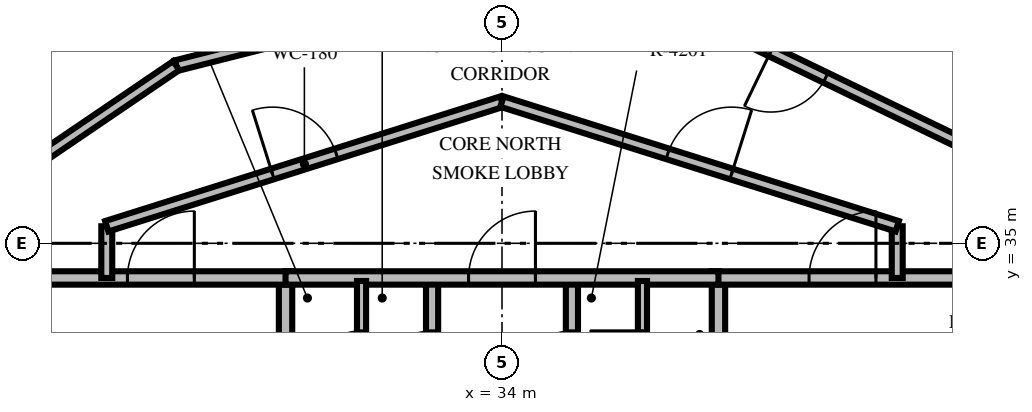
"""IFC4 building model, lengths in metres.
Left out: names, types, materials, properties, quantities, classifications, styles, units other than length and angle.
Written with IfcOpenShell. Run it as: python <this file> out.ifc"""

import sys

from ifc_helpers import new_model, si_unit, direction, frame, frame_2d, origin, place, context, subcontext, project, spatial, rectangle, extrude, element, fill, save


model = new_model("IFC4")
c1 = context("Model", 3, precision=1e-05, world=origin(), true_north=direction((0.0, 1.0)))
c2 = subcontext(c1, "Body", "Model", "MODEL_VIEW")
j1 = project(units=[si_unit("LENGTHUNIT", "METRE"), si_unit("PLANEANGLEUNIT", "RADIAN")], contexts=[c1])
p1 = place(None, origin())
s1 = spatial("IfcSite", under=j1, at=p1, CompositionType="ELEMENT")
p2 = place(p1, origin())
s2 = spatial("IfcBuilding", under=s1, at=p2, CompositionType="ELEMENT")
p3 = place(p2, frame((0.0, 0.0, 177.2)))
s3 = spatial("IfcBuildingStorey", under=s2, at=p3, CompositionType="ELEMENT", Elevation=177.2)
p4 = place(p3, frame((30.44, 30.05, 0.0), z_axis=(0.0, 0.0, 1.0), x_axis=(0.0, 1.0, 0.0)))
e1 = element("IfcWall", 1, at=p4, inside=s3, PredefinedType="SOLIDWALL", context=c2, shape_type="SweptSolid", body=[
    extrude(rectangle(XDim=4.38, YDim=0.22, at=frame_2d((2.19, 0.0))), origin(), (0.0, 0.0, 1.0), 2.46),
])
p5 = place(p4, frame((0.8, 0.0, 0.0)))
e2 = element("IfcOpeningElement", 2, at=p5, cuts=e1, PredefinedType="OPENING", context=c2, shape_type="SweptSolid", body=[
    extrude(rectangle(XDim=1.05, YDim=2.1, at=frame_2d((0.525, 1.05))), frame((0.0, 0.12, 0.0), z_axis=(0.0, -1.0, 0.0), x_axis=(1.0, 0.0, 0.0)), (0.0, 0.0, 1.0), 0.24),
])
p6 = place(p3, frame((26.24, 34.43, 0.0), z_axis=(0.0, 0.0, 1.0), x_axis=(1.0, 0.0, 0.0)))
e3 = element("IfcWall", 3, at=p6, inside=s3, PredefinedType="SOLIDWALL", context=c2, shape_type="SweptSolid", body=[
    extrude(rectangle(XDim=4.31, YDim=0.22, at=frame_2d((2.155, 0.0))), origin(), (0.0, 0.0, 1.0), 2.46),
])
p7 = place(p6, frame((1.6, 0.0, 0.0)))
e4 = element("IfcOpeningElement", 4, at=p7, cuts=e3, PredefinedType="OPENING", context=c2, shape_type="SweptSolid", body=[
    extrude(rectangle(XDim=1.1, YDim=2.15, at=frame_2d((0.55, 1.075))), frame((0.0, 0.12, 0.0), z_axis=(0.0, -1.0, 0.0), x_axis=(1.0, 0.0, 0.0)), (0.0, 0.0, 1.0), 0.24),
])
p8 = place(p3, frame((32.85, 30.05, 0.0), z_axis=(0.0, 0.0, 1.0), x_axis=(0.0, 1.0, 0.0)))
e5 = element("IfcWall", 5, at=p8, inside=s3, PredefinedType="SOLIDWALL", context=c2, shape_type="SweptSolid", body=[
    extrude(rectangle(XDim=4.38, YDim=0.2, at=frame_2d((2.19, 0.0))), origin(), (0.0, 0.0, 1.0), 2.46),
])
p9 = place(p8, frame((2.65, 0.0, 0.0)))
e6 = element("IfcOpeningElement", 6, at=p9, cuts=e5, PredefinedType="OPENING", context=c2, shape_type="SweptSolid", body=[
    extrude(rectangle(XDim=0.86, YDim=2.05, at=frame_2d((0.43, 1.025))), frame((0.0, 0.11, 0.0), z_axis=(0.0, -1.0, 0.0), x_axis=(1.0, 0.0, 0.0)), (0.0, 0.0, 1.0), 0.22),
])
p10 = place(p3, frame((37.56, 30.05, 0.0), z_axis=(0.0, 0.0, 1.0), x_axis=(0.0, 1.0, 0.0)))
e7 = element("IfcWall", 7, at=p10, inside=s3, PredefinedType="SOLIDWALL", context=c2, shape_type="SweptSolid", body=[
    extrude(rectangle(XDim=4.38, YDim=0.22, at=frame_2d((2.19, 0.0))), origin(), (0.0, 0.0, 1.0), 2.46),
])
p11 = place(p10, frame((0.8, 0.0, 0.0)))
e8 = element("IfcOpeningElement", 8, at=p11, cuts=e7, PredefinedType="OPENING", context=c2, shape_type="SweptSolid", body=[
    extrude(rectangle(XDim=1.05, YDim=2.1, at=frame_2d((0.525, 1.05))), frame((0.0, 0.12, 0.0), z_axis=(0.0, -1.0, 0.0), x_axis=(1.0, 0.0, 0.0)), (0.0, 0.0, 1.0), 0.24),
])
p12 = place(p3, frame((37.45, 34.43, 0.0), z_axis=(0.0, 0.0, 1.0), x_axis=(1.0, 0.0, 0.0)))
e9 = element("IfcWall", 9, at=p12, inside=s3, PredefinedType="SOLIDWALL", context=c2, shape_type="SweptSolid", body=[
    extrude(rectangle(XDim=4.31, YDim=0.22, at=frame_2d((2.155, 0.0))), origin(), (0.0, 0.0, 1.0), 2.46),
])
p13 = place(p12, frame((1.6, 0.0, 0.0)))
e10 = element("IfcOpeningElement", 10, at=p13, cuts=e9, PredefinedType="OPENING", context=c2, shape_type="SweptSolid", body=[
    extrude(rectangle(XDim=1.1, YDim=2.15, at=frame_2d((0.55, 1.075))), frame((0.0, 0.12, 0.0), z_axis=(0.0, -1.0, 0.0), x_axis=(1.0, 0.0, 0.0)), (0.0, 0.0, 1.0), 0.24),
])
p14 = place(p3, frame((35.15, 30.05, 0.0), z_axis=(0.0, 0.0, 1.0), x_axis=(0.0, 1.0, 0.0)))
e11 = element("IfcWall", 11, at=p14, inside=s3, PredefinedType="SOLIDWALL", context=c2, shape_type="SweptSolid", body=[
    extrude(rectangle(XDim=4.38, YDim=0.2, at=frame_2d((2.19, 0.0))), origin(), (0.0, 0.0, 1.0), 2.46),
])
p15 = place(p14, frame((2.65, 0.0, 0.0)))
e12 = element("IfcOpeningElement", 12, at=p15, cuts=e11, PredefinedType="OPENING", context=c2, shape_type="SweptSolid", body=[
    extrude(rectangle(XDim=0.86, YDim=2.05, at=frame_2d((0.43, 1.025))), frame((0.0, 0.11, 0.0), z_axis=(0.0, -1.0, 0.0), x_axis=(1.0, 0.0, 0.0)), (0.0, 0.0, 1.0), 0.22),
])
p16 = place(p3, frame((30.44, 34.43, 0.0), z_axis=(0.0, 0.0, 1.0), x_axis=(1.0, 0.0, 0.0)))
e13 = element("IfcWall", 13, at=p16, inside=s3, PredefinedType="SOLIDWALL", context=c2, shape_type="SweptSolid", body=[
    extrude(rectangle(XDim=7.12, YDim=0.22, at=frame_2d((3.56, 0.0))), origin(), (0.0, 0.0, 1.0), 2.46),
])
p17 = place(p16, frame((3.01, 0.0, 0.0)))
e14 = element("IfcOpeningElement", 14, at=p17, cuts=e13, PredefinedType="OPENING", context=c2, shape_type="SweptSolid", body=[
    extrude(rectangle(XDim=1.1, YDim=2.15, at=frame_2d((0.55, 1.075))), frame((0.0, 0.12, 0.0), z_axis=(0.0, -1.0, 0.0), x_axis=(1.0, 0.0, 0.0)), (0.0, 0.0, 1.0), 0.24),
])
p18 = place(p3, frame((31.69, 32.05, 0.0), z_axis=(0.0, 0.0, 1.0), x_axis=(0.0, 1.0, 0.0)))
e15 = element("IfcWall", 15, at=p18, inside=s3, PredefinedType="PARTITIONING", context=c2, shape_type="SweptSolid", body=[
    extrude(rectangle(XDim=2.33, YDim=0.15, at=frame_2d((1.165, 0.0))), origin(), (0.0, 0.0, 1.0), 2.46),
])
p19 = place(p18, frame((0.65, 0.0, 0.0)))
e16 = element("IfcOpeningElement", 16, at=p19, cuts=e15, PredefinedType="OPENING", context=c2, shape_type="SweptSolid", body=[
    extrude(rectangle(XDim=0.86, YDim=2.05, at=frame_2d((0.43, 1.025))), frame((0.0, 0.085, 0.0), z_axis=(0.0, -1.0, 0.0), x_axis=(1.0, 0.0, 0.0)), (0.0, 0.0, 1.0), 0.17),
])
p20 = place(p3, frame((36.31, 32.05, 0.0), z_axis=(0.0, 0.0, 1.0), x_axis=(0.0, 1.0, 0.0)))
e17 = element("IfcWall", 17, at=p20, inside=s3, PredefinedType="PARTITIONING", context=c2, shape_type="SweptSolid", body=[
    extrude(rectangle(XDim=2.33, YDim=0.15, at=frame_2d((1.165, 0.0))), origin(), (0.0, 0.0, 1.0), 2.46),
])
p21 = place(p20, frame((0.65, 0.0, 0.0)))
e18 = element("IfcOpeningElement", 18, at=p21, cuts=e17, PredefinedType="OPENING", context=c2, shape_type="SweptSolid", body=[
    extrude(rectangle(XDim=0.86, YDim=2.05, at=frame_2d((0.43, 1.025))), frame((0.0, 0.085, 0.0), z_axis=(0.0, -1.0, 0.0), x_axis=(1.0, 0.0, 0.0)), (0.0, 0.0, 1.0), 0.17),
])
for number, where, z_axis, x_axis in (
    (19, (27.5, 34.43, 0.0), (0.0, 0.0, 1.0), (0.0, 1.0, 0.0)),
    (20, (40.5, 35.28, 0.0), (0.0, 0.0, 1.0), (0.0, -1.0, 0.0)),
):
    element("IfcWall", number, at=place(p3, frame(where, z_axis=z_axis, x_axis=x_axis)), inside=s3, PredefinedType="PARTITIONING", context=c2, shape_type="SweptSolid", body=[
        extrude(rectangle(XDim=0.85, YDim=0.18, at=frame_2d((0.425, 0.0))), origin(), (0.0, 0.0, 1.0), 2.46),
    ])
p22 = place(p3, frame((27.5, 35.28, 0.0), z_axis=(0.0, 0.0, 1.0), x_axis=(0.953691418528, 0.300786765376, 0.0)))
e21 = element("IfcWall", 21, at=p22, inside=s3, PredefinedType="PARTITIONING", context=c2, shape_type="SweptSolid", body=[
    extrude(rectangle(XDim=6.816, YDim=0.18, at=frame_2d((3.408, 0.0))), origin(), (0.0, 0.0, 1.0), 2.46),
])
p23 = place(p22, frame((2.858, 0.0, 0.0)))
e22 = element("IfcOpeningElement", 22, at=p23, cuts=e21, PredefinedType="OPENING", context=c2, shape_type="SweptSolid", body=[
    extrude(rectangle(XDim=1.1, YDim=2.15, at=frame_2d((0.55, 1.075))), frame((0.0, 0.1, 0.0), z_axis=(0.0, -1.0, 0.0), x_axis=(1.0, 0.0, 0.0)), (0.0, 0.0, 1.0), 0.2),
])
p24 = place(p3, frame((34.0, 37.33, 0.0), z_axis=(0.0, 0.0, 1.0), x_axis=(0.953691418528, -0.300786765376, 0.0)))
e23 = element("IfcWall", 23, at=p24, inside=s3, PredefinedType="PARTITIONING", context=c2, shape_type="SweptSolid", body=[
    extrude(rectangle(XDim=6.816, YDim=0.18, at=frame_2d((3.408, 0.0))), origin(), (0.0, 0.0, 1.0), 2.46),
])
p25 = place(p24, frame((2.858, 0.0, 0.0)))
e24 = element("IfcOpeningElement", 24, at=p25, cuts=e23, PredefinedType="OPENING", context=c2, shape_type="SweptSolid", body=[
    extrude(rectangle(XDim=1.1, YDim=2.15, at=frame_2d((0.55, 1.075))), frame((0.0, 0.1, 0.0), z_axis=(0.0, -1.0, 0.0), x_axis=(1.0, 0.0, 0.0)), (0.0, 0.0, 1.0), 0.2),
])
p26 = place(p3, frame((41.646, 36.601, 0.0), z_axis=(0.0, 0.0, 1.0), x_axis=(-0.9003278794, 0.435212258071, 0.0)))
e25 = element("IfcWall", 25, at=p26, inside=s3, PredefinedType="PARTITIONING", context=c2, shape_type="SweptSolid", body=[
    extrude(rectangle(XDim=4.539, YDim=0.18, at=frame_2d((2.27, 0.0))), origin(), (0.0, 0.0, 1.0), 2.46),
])
p27 = place(p26, frame((2.579, 0.0, 0.0)))
e26 = element("IfcOpeningElement", 26, at=p27, cuts=e25, PredefinedType="OPENING", context=c2, shape_type="SweptSolid", body=[
    extrude(rectangle(XDim=1.0, YDim=2.15, at=frame_2d((0.5, 1.075))), frame((0.0, 0.1, 0.0), z_axis=(0.0, -1.0, 0.0), x_axis=(1.0, 0.0, 0.0)), (0.0, 0.0, 1.0), 0.2),
])
for number, where, z_axis, x_axis in (
    (27, (33.043, 39.035, 0.0), (0.0, 0.0, 1.0), (-0.969, -0.245, 0.0)),
    (28, (28.642, 37.921, 0.0), (0.0, 0.0, 1.0), (-0.827, -0.562, 0.0)),
):
    element("IfcWall", number, at=place(p3, frame(where, z_axis=z_axis, x_axis=x_axis)), inside=s3, PredefinedType="PARTITIONING", context=c2, shape_type="SweptSolid", body=[
        extrude(rectangle(XDim=4.539, YDim=0.18, at=frame_2d((2.27, 0.0))), origin(), (0.0, 0.0, 1.0), 2.46),
    ])
p28 = place(p3, frame((27.781, 39.837, 0.0), z_axis=(0.0, 0.0, 1.0), x_axis=(-0.827069550148, -0.562099599019, 0.0)))
e29 = element("IfcWall", 29, at=p28, inside=s3, PredefinedType="PARTITIONING", context=c2, shape_type="SweptSolid", body=[
    extrude(rectangle(XDim=5.269, YDim=0.14, at=frame_2d((2.634, 0.0))), origin(), (0.0, 0.0, 1.0), 2.46),
])
p29 = place(p7, origin())
e30 = element("IfcDoor", 30, at=p29, inside=s3, OperationType="SINGLE_SWING_RIGHT", PredefinedType="DOOR", context=c2, shape_type="SweptSolid", body=[
    extrude(rectangle(XDim=1.1, YDim=2.15, at=frame_2d((0.55, 1.075))), frame((0.0, 0.025, 0.0), z_axis=(0.0, -1.0, 0.0), x_axis=(1.0, 0.0, 0.0)), (0.0, 0.0, 1.0), 0.05),
])
fill(e4, e30)
p30 = place(p9, origin())
e31 = element("IfcDoor", 31, at=p30, inside=s3, OperationType="SINGLE_SWING_LEFT", PredefinedType="TRAPDOOR", context=c2, shape_type="SweptSolid", body=[
    extrude(rectangle(XDim=0.86, YDim=2.05, at=frame_2d((0.43, 1.025))), frame((0.0, 0.025, 0.0), z_axis=(0.0, -1.0, 0.0), x_axis=(1.0, 0.0, 0.0)), (0.0, 0.0, 1.0), 0.05),
])
fill(e6, e31)
p31 = place(p13, origin())
e32 = element("IfcDoor", 32, at=p31, inside=s3, OperationType="SINGLE_SWING_RIGHT", PredefinedType="DOOR", context=c2, shape_type="SweptSolid", body=[
    extrude(rectangle(XDim=1.1, YDim=2.15, at=frame_2d((0.55, 1.075))), frame((0.0, 0.025, 0.0), z_axis=(0.0, -1.0, 0.0), x_axis=(1.0, 0.0, 0.0)), (0.0, 0.0, 1.0), 0.05),
])
fill(e10, e32)
p32 = place(p15, origin())
e33 = element("IfcDoor", 33, at=p32, inside=s3, OperationType="SINGLE_SWING_LEFT", PredefinedType="TRAPDOOR", context=c2, shape_type="SweptSolid", body=[
    extrude(rectangle(XDim=0.86, YDim=2.05, at=frame_2d((0.43, 1.025))), frame((0.0, 0.025, 0.0), z_axis=(0.0, -1.0, 0.0), x_axis=(1.0, 0.0, 0.0)), (0.0, 0.0, 1.0), 0.05),
])
fill(e12, e33)
p33 = place(p17, origin())
e34 = element("IfcDoor", 34, at=p33, inside=s3, OperationType="SINGLE_SWING_RIGHT", PredefinedType="DOOR", context=c2, shape_type="SweptSolid", body=[
    extrude(rectangle(XDim=1.1, YDim=2.15, at=frame_2d((0.55, 1.075))), frame((0.0, 0.025, 0.0), z_axis=(0.0, -1.0, 0.0), x_axis=(1.0, 0.0, 0.0)), (0.0, 0.0, 1.0), 0.05),
])
fill(e14, e34)
p34 = place(p19, origin())
e35 = element("IfcDoor", 35, at=p34, inside=s3, OperationType="SINGLE_SWING_LEFT", PredefinedType="TRAPDOOR", context=c2, shape_type="SweptSolid", body=[
    extrude(rectangle(XDim=0.86, YDim=2.05, at=frame_2d((0.43, 1.025))), frame((0.0, 0.025, 0.0), z_axis=(0.0, -1.0, 0.0), x_axis=(1.0, 0.0, 0.0)), (0.0, 0.0, 1.0), 0.05),
])
fill(e16, e35)
p35 = place(p21, origin())
e36 = element("IfcDoor", 36, at=p35, inside=s3, OperationType="SINGLE_SWING_RIGHT", PredefinedType="TRAPDOOR", context=c2, shape_type="SweptSolid", body=[
    extrude(rectangle(XDim=0.86, YDim=2.05, at=frame_2d((0.43, 1.025))), frame((0.0, 0.025, 0.0), z_axis=(0.0, -1.0, 0.0), x_axis=(1.0, 0.0, 0.0)), (0.0, 0.0, 1.0), 0.05),
])
fill(e18, e36)
p36 = place(p23, origin())
e37 = element("IfcDoor", 37, at=p36, inside=s3, OperationType="SINGLE_SWING_LEFT", PredefinedType="DOOR", context=c2, shape_type="SweptSolid", body=[
    extrude(rectangle(XDim=1.1, YDim=2.15, at=frame_2d((0.55, 1.075))), frame((0.0, 0.025, 0.0), z_axis=(0.0, -1.0, 0.0), x_axis=(1.0, 0.0, 0.0)), (0.0, 0.0, 1.0), 0.05),
])
fill(e22, e37)
p37 = place(p25, origin())
e38 = element("IfcDoor", 38, at=p37, inside=s3, OperationType="SINGLE_SWING_RIGHT", PredefinedType="DOOR", context=c2, shape_type="SweptSolid", body=[
    extrude(rectangle(XDim=1.1, YDim=2.15, at=frame_2d((0.55, 1.075))), frame((0.0, 0.025, 0.0), z_axis=(0.0, -1.0, 0.0), x_axis=(1.0, 0.0, 0.0)), (0.0, 0.0, 1.0), 0.05),
])
fill(e24, e38)
p38 = place(p27, origin())
e39 = element("IfcDoor", 39, at=p38, inside=s3, OperationType="SINGLE_SWING_RIGHT", PredefinedType="DOOR", context=c2, shape_type="SweptSolid", body=[
    extrude(rectangle(XDim=1.0, YDim=2.15, at=frame_2d((0.5, 1.075))), frame((0.0, 0.025, 0.0), z_axis=(0.0, -1.0, 0.0), x_axis=(1.0, 0.0, 0.0)), (0.0, 0.0, 1.0), 0.05),
])
fill(e26, e39)
save(model, sys.argv[1])
